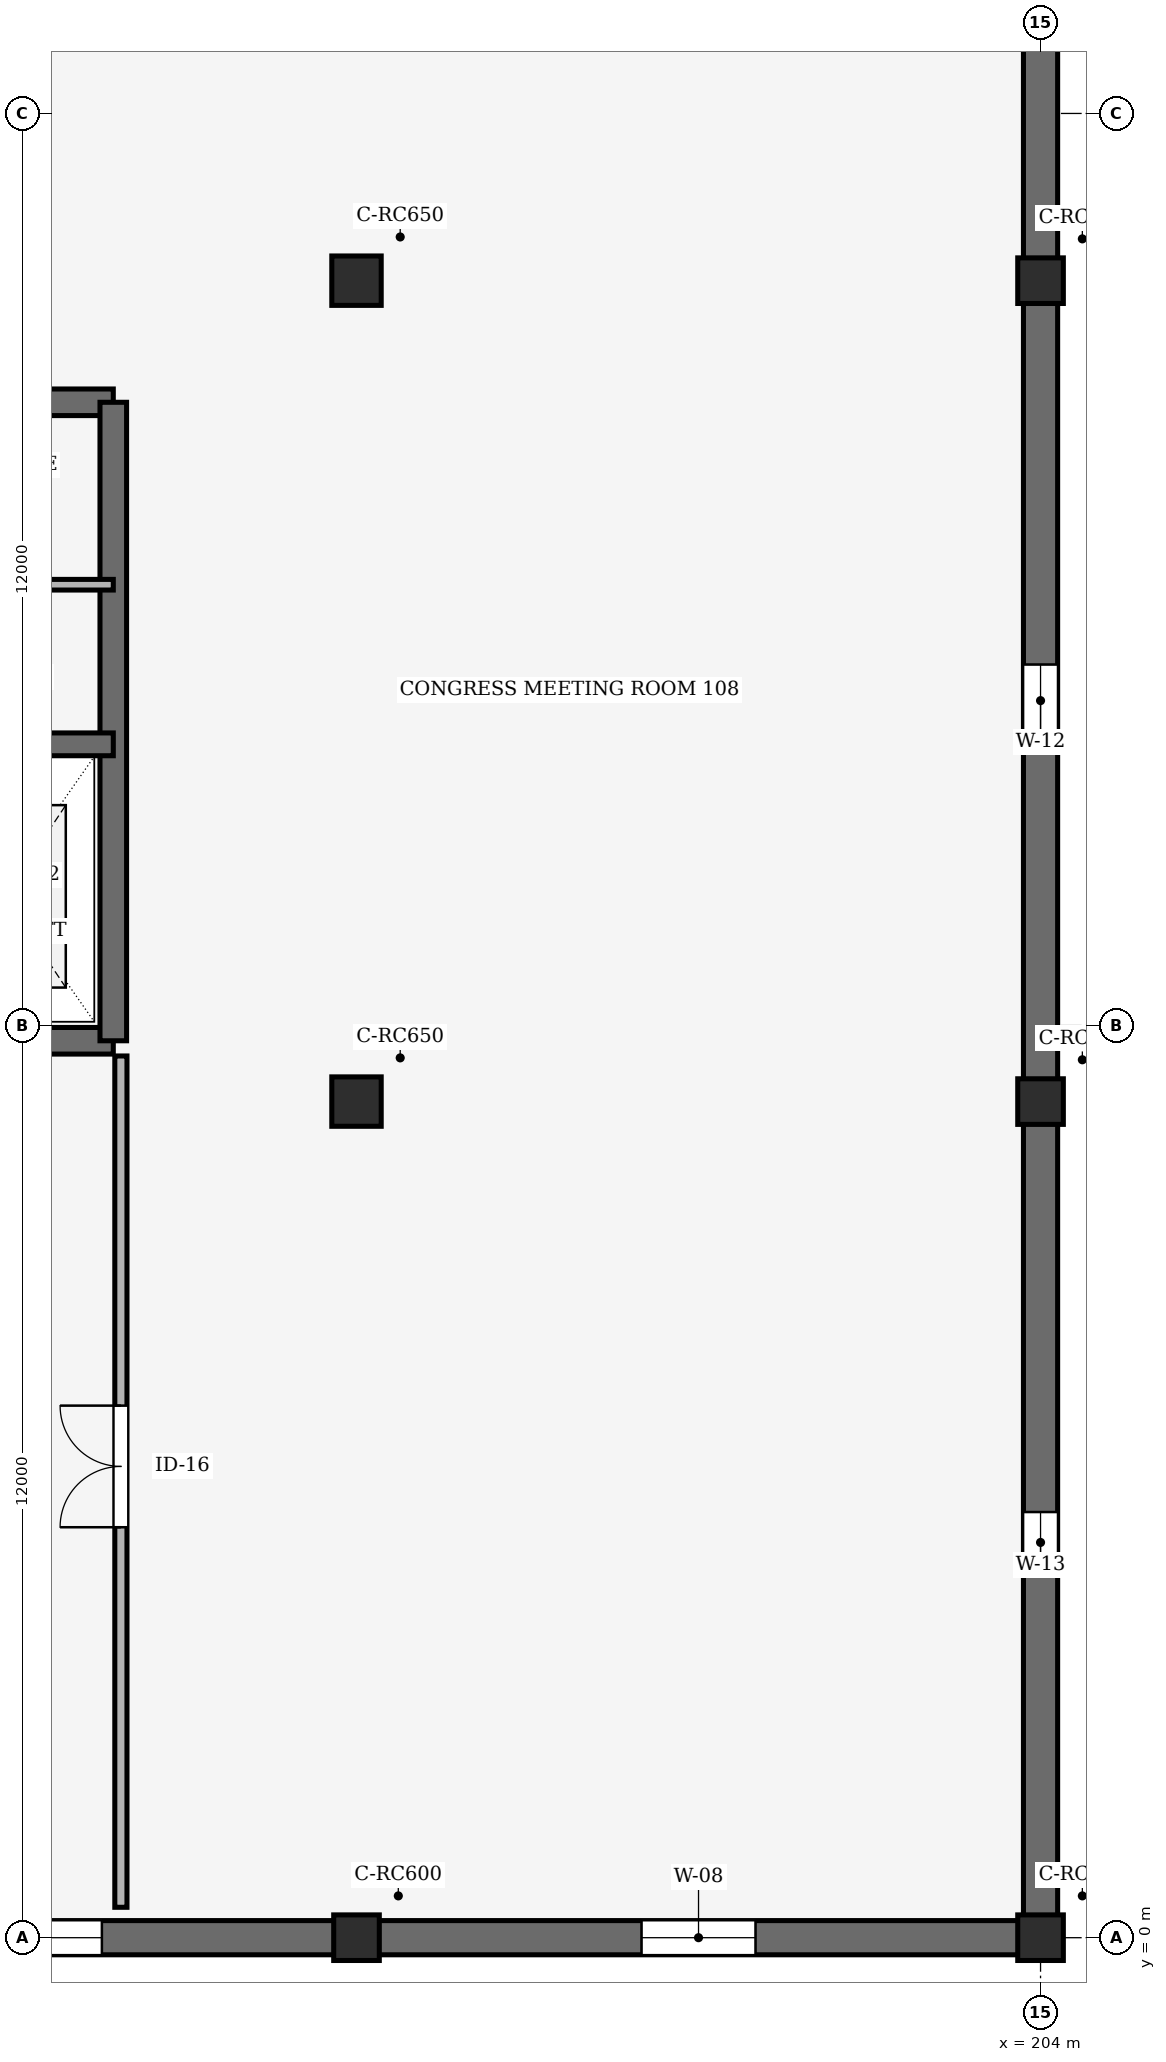
"""IFC4 building model, lengths in metres.
Left out: names, types, materials, properties, quantities, classifications, styles, units other than length and angle.
Written with IfcOpenShell. Run it as: python <this file> out.ifc"""

import sys

from ifc_helpers import new_model, si_unit, direction, frame, frame_2d, origin, origin_2d, place, context, subcontext, project, spatial, rectangle, extrude, element, fill, save


model = new_model("IFC4")
c1 = context("Model", 3, precision=1e-05, world=origin(), true_north=direction((0.0, 1.0)))
c2 = subcontext(c1, "Body", "Model", "MODEL_VIEW")
j1 = project(units=[si_unit("LENGTHUNIT", "METRE"), si_unit("PLANEANGLEUNIT", "RADIAN")], contexts=[c1])
p1 = place(None, origin())
s1 = spatial("IfcSite", under=j1, at=p1, CompositionType="ELEMENT")
p2 = place(p1, origin())
s2 = spatial("IfcBuilding", under=s1, at=p2, CompositionType="ELEMENT")
p3 = place(p2, frame((0.0, 0.0, 5.4)))
s3 = spatial("IfcBuildingStorey", under=s2, at=p3, CompositionType="ELEMENT", Elevation=5.4)
p4 = place(p3, frame((195.0, 0.0, 0.0), z_axis=(0.0, 0.0, 1.0), x_axis=(1.0, 0.0, 0.0)))
e1 = element("IfcColumn", 1, at=p4, inside=s3, PredefinedType="COLUMN", context=c2, shape_type="SweptSolid", body=[
    extrude(rectangle(XDim=0.6, YDim=0.6, at=origin_2d()), origin(), (0.0, 0.0, 1.0), 5.4),
])
for number, where, z_axis, x_axis in (
    (2, (195.0, 11.0, 0.0), (0.0, 0.0, 1.0), (1.0, 0.0, 0.0)),
    (3, (195.0, 21.8, 0.0), (0.0, 0.0, 1.0), (1.0, 0.0, 0.0)),
):
    element("IfcColumn", number, at=place(p3, frame(where, z_axis=z_axis, x_axis=x_axis)), inside=s3, PredefinedType="COLUMN", context=c2, shape_type="SweptSolid", body=[
        extrude(rectangle(XDim=0.65, YDim=0.65, at=origin_2d()), origin(), (0.0, 0.0, 1.0), 5.4),
    ])
for number, where, z_axis, x_axis in (
    (4, (204.0, 0.0, 0.0), (0.0, 0.0, 1.0), (1.0, 0.0, 0.0)),
    (5, (204.0, 11.0, 0.0), (0.0, 0.0, 1.0), (1.0, 0.0, 0.0)),
    (6, (204.0, 21.8, 0.0), (0.0, 0.0, 1.0), (1.0, 0.0, 0.0)),
):
    element("IfcColumn", number, at=place(p3, frame(where, z_axis=z_axis, x_axis=x_axis)), inside=s3, PredefinedType="COLUMN", context=c2, shape_type="SweptSolid", body=[
        extrude(rectangle(XDim=0.6, YDim=0.6, at=origin_2d()), origin(), (0.0, 0.0, 1.0), 5.4),
    ])
p5 = place(p3, frame((186.0, 0.0, 0.0), z_axis=(0.0, 0.0, 1.0), x_axis=(1.0, 0.0, 0.0)))
e7 = element("IfcWall", 7, at=p5, inside=s3, PredefinedType="SOLIDWALL", context=c2, shape_type="SweptSolid", body=[
    extrude(rectangle(XDim=9.0, YDim=0.45, at=frame_2d((4.5, 0.0))), origin(), (0.0, 0.0, 1.0), 4.3),
])
p6 = place(p5, frame((3.35, 0.0, 0.9)))
e8 = element("IfcOpeningElement", 8, at=p6, cuts=e7, PredefinedType="OPENING", context=c2, shape_type="SweptSolid", body=[
    extrude(rectangle(XDim=2.3, YDim=3.1, at=frame_2d((1.15, 1.55))), frame((0.0, 0.235, 0.0), z_axis=(0.0, -1.0, 0.0), x_axis=(1.0, 0.0, 0.0)), (0.0, 0.0, 1.0), 0.47),
])
p7 = place(p3, frame((195.0, 0.0, 0.0), z_axis=(0.0, 0.0, 1.0), x_axis=(1.0, 0.0, 0.0)))
e9 = element("IfcWall", 9, at=p7, inside=s3, PredefinedType="SOLIDWALL", context=c2, shape_type="SweptSolid", body=[
    extrude(rectangle(XDim=9.0, YDim=0.45, at=frame_2d((4.5, 0.0))), origin(), (0.0, 0.0, 1.0), 4.3),
])
p8 = place(p7, frame((3.75, 0.0, 0.9)))
e10 = element("IfcOpeningElement", 10, at=p8, cuts=e9, PredefinedType="OPENING", context=c2, shape_type="SweptSolid", body=[
    extrude(rectangle(XDim=1.5, YDim=2.15, at=frame_2d((0.75, 1.075))), frame((0.0, 0.235, 0.0), z_axis=(0.0, -1.0, 0.0), x_axis=(1.0, 0.0, 0.0)), (0.0, 0.0, 1.0), 0.47),
])
p9 = place(p3, frame((204.0, 0.0, 0.0), z_axis=(0.0, 0.0, 1.0), x_axis=(0.0, 1.0, 0.0)))
e11 = element("IfcWall", 11, at=p9, inside=s3, PredefinedType="SOLIDWALL", context=c2, shape_type="SweptSolid", body=[
    extrude(rectangle(XDim=11.0, YDim=0.45, at=frame_2d((5.5, 0.0))), origin(), (0.0, 0.0, 1.0), 4.3),
])
p10 = place(p9, frame((4.8, 0.0, 1.0)))
e12 = element("IfcOpeningElement", 12, at=p10, cuts=e11, PredefinedType="OPENING", context=c2, shape_type="SweptSolid", body=[
    extrude(rectangle(XDim=0.8, YDim=1.6, at=frame_2d((0.4, 0.8))), frame((0.0, 0.235, 0.0), z_axis=(0.0, -1.0, 0.0), x_axis=(1.0, 0.0, 0.0)), (0.0, 0.0, 1.0), 0.47),
])
p11 = place(p3, frame((204.0, 11.0, 0.0), z_axis=(0.0, 0.0, 1.0), x_axis=(0.0, 1.0, 0.0)))
e13 = element("IfcWall", 13, at=p11, inside=s3, PredefinedType="SOLIDWALL", context=c2, shape_type="SweptSolid", body=[
    extrude(rectangle(XDim=10.8, YDim=0.45, at=frame_2d((5.4, 0.0))), origin(), (0.0, 0.0, 1.0), 4.3),
])
p12 = place(p11, frame((4.8, 0.0, 1.0)))
e14 = element("IfcOpeningElement", 14, at=p12, cuts=e13, PredefinedType="OPENING", context=c2, shape_type="SweptSolid", body=[
    extrude(rectangle(XDim=0.95, YDim=2.1, at=frame_2d((0.475, 1.05))), frame((0.0, 0.235, 0.0), z_axis=(0.0, -1.0, 0.0), x_axis=(1.0, 0.0, 0.0)), (0.0, 0.0, 1.0), 0.47),
])
p13 = place(p3, frame((204.0, 21.8, 0.0), z_axis=(0.0, 0.0, 1.0), x_axis=(0.0, 1.0, 0.0)))
e15 = element("IfcWall", 15, at=p13, inside=s3, PredefinedType="SOLIDWALL", context=c2, shape_type="SweptSolid", body=[
    extrude(rectangle(XDim=11.0, YDim=0.45, at=frame_2d((5.5, 0.0))), origin(), (0.0, 0.0, 1.0), 4.3),
])
p14 = place(p13, frame((4.8, 0.0, 1.0)))
e16 = element("IfcOpeningElement", 16, at=p14, cuts=e15, PredefinedType="OPENING", context=c2, shape_type="SweptSolid", body=[
    extrude(rectangle(XDim=0.8, YDim=1.6, at=frame_2d((0.4, 0.8))), frame((0.0, 0.235, 0.0), z_axis=(0.0, -1.0, 0.0), x_axis=(1.0, 0.0, 0.0)), (0.0, 0.0, 1.0), 0.47),
])
for number, where, z_axis, x_axis in (
    (17, (181.6, 11.8, 0.0), (0.0, 0.0, 1.0), (1.0, 0.0, 0.0)),
    (18, (191.8, 20.2, 0.0), (0.0, 0.0, 1.0), (-1.0, 0.0, 0.0)),
):
    element("IfcWall", number, at=place(p3, frame(where, z_axis=z_axis, x_axis=x_axis)), inside=s3, PredefinedType="SHEAR", context=c2, shape_type="SweptSolid", body=[
        extrude(rectangle(XDim=10.2, YDim=0.35, at=frame_2d((5.1, 0.0))), origin(), (0.0, 0.0, 1.0), 5.4),
    ])
p15 = place(p3, frame((191.8, 11.8, 0.0), z_axis=(0.0, 0.0, 1.0), x_axis=(0.0, 1.0, 0.0)))
e19 = element("IfcWall", 19, at=p15, inside=s3, PredefinedType="SHEAR", context=c2, shape_type="SweptSolid", body=[
    extrude(rectangle(XDim=8.4, YDim=0.35, at=frame_2d((4.2, 0.0))), origin(), (0.0, 0.0, 1.0), 5.4),
])
p16 = place(p3, frame((181.6, 15.7, 0.0), z_axis=(0.0, 0.0, 1.0), x_axis=(1.0, 0.0, 0.0)))
e20 = element("IfcWall", 20, at=p16, inside=s3, PredefinedType="SHEAR", context=c2, shape_type="SweptSolid", body=[
    extrude(rectangle(XDim=10.2, YDim=0.3, at=frame_2d((5.1, 0.0))), origin(), (0.0, 0.0, 1.0), 5.4),
])
p17 = place(p16, frame((0.28, 0.0, 0.0)))
e21 = element("IfcOpeningElement", 21, at=p17, cuts=e20, PredefinedType="OPENING", context=c2, shape_type="SweptSolid", body=[
    extrude(rectangle(XDim=1.45, YDim=2.15, at=frame_2d((0.725, 1.075))), frame((0.0, 0.16, 0.0), z_axis=(0.0, -1.0, 0.0), x_axis=(1.0, 0.0, 0.0)), (0.0, 0.0, 1.0), 0.32),
])
p18 = place(p16, frame((8.225, 0.0, 0.0)))
e22 = element("IfcOpeningElement", 22, at=p18, cuts=e20, PredefinedType="OPENING", context=c2, shape_type="SweptSolid", body=[
    extrude(rectangle(XDim=1.1, YDim=2.15, at=frame_2d((0.55, 1.075))), frame((0.0, 0.16, 0.0), z_axis=(0.0, -1.0, 0.0), x_axis=(1.0, 0.0, 0.0)), (0.0, 0.0, 1.0), 0.32),
])
p19 = place(p3, frame((181.6, 17.8, 0.0), z_axis=(0.0, 0.0, 1.0), x_axis=(1.0, 0.0, 0.0)))
e23 = element("IfcWall", 23, at=p19, inside=s3, PredefinedType="PARTITIONING", context=c2, shape_type="SweptSolid", body=[
    extrude(rectangle(XDim=10.2, YDim=0.14, at=frame_2d((5.1, 0.0))), origin(), (0.0, 0.0, 1.0), 4.325),
])
p20 = place(p19, frame((0.9, 0.0, 0.0)))
e24 = element("IfcOpeningElement", 24, at=p20, cuts=e23, PredefinedType="OPENING", context=c2, shape_type="SweptSolid", body=[
    extrude(rectangle(XDim=0.9, YDim=2.1, at=frame_2d((0.45, 1.05))), frame((0.0, 0.08, 0.0), z_axis=(0.0, -1.0, 0.0), x_axis=(1.0, 0.0, 0.0)), (0.0, 0.0, 1.0), 0.16),
])
p21 = place(p19, frame((4.3, 0.0, 0.0)))
e25 = element("IfcOpeningElement", 25, at=p21, cuts=e23, PredefinedType="OPENING", context=c2, shape_type="SweptSolid", body=[
    extrude(rectangle(XDim=0.9, YDim=2.1, at=frame_2d((0.45, 1.05))), frame((0.0, 0.08, 0.0), z_axis=(0.0, -1.0, 0.0), x_axis=(1.0, 0.0, 0.0)), (0.0, 0.0, 1.0), 0.16),
])
p22 = place(p19, frame((7.7, 0.0, 0.0)))
e26 = element("IfcOpeningElement", 26, at=p22, cuts=e23, PredefinedType="OPENING", context=c2, shape_type="SweptSolid", body=[
    extrude(rectangle(XDim=0.95, YDim=2.1, at=frame_2d((0.475, 1.05))), frame((0.0, 0.08, 0.0), z_axis=(0.0, -1.0, 0.0), x_axis=(1.0, 0.0, 0.0)), (0.0, 0.0, 1.0), 0.16),
])
p23 = place(p3, frame((191.9, 0.4, 0.0), z_axis=(0.0, 0.0, 1.0), x_axis=(0.0, 1.0, 0.0)))
e27 = element("IfcWall", 27, at=p23, inside=s3, PredefinedType="PARTITIONING", context=c2, shape_type="SweptSolid", body=[
    extrude(rectangle(XDim=11.2, YDim=0.16, at=frame_2d((5.6, 0.0))), origin(), (0.0, 0.0, 1.0), 3.6),
])
p24 = place(p23, frame((5.0, 0.0, 0.0)))
e28 = element("IfcOpeningElement", 28, at=p24, cuts=e27, PredefinedType="OPENING", context=c2, shape_type="SweptSolid", body=[
    extrude(rectangle(XDim=1.6, YDim=2.2, at=frame_2d((0.8, 1.1))), frame((0.0, 0.09, 0.0), z_axis=(0.0, -1.0, 0.0), x_axis=(1.0, 0.0, 0.0)), (0.0, 0.0, 1.0), 0.18),
])
p25 = place(p6, origin())
e29 = element("IfcWindow", 29, at=p25, inside=s3, PartitioningType="DOUBLE_PANEL_VERTICAL", PredefinedType="WINDOW", context=c2, shape_type="SweptSolid", body=[
    extrude(rectangle(XDim=2.3, YDim=3.1, at=frame_2d((1.15, 1.55))), frame((0.0, 0.03, 0.0), z_axis=(0.0, -1.0, 0.0), x_axis=(1.0, 0.0, 0.0)), (0.0, 0.0, 1.0), 0.06),
])
fill(e8, e29)
p26 = place(p8, origin())
e30 = element("IfcWindow", 30, at=p26, inside=s3, PartitioningType="DOUBLE_PANEL_VERTICAL", PredefinedType="WINDOW", context=c2, shape_type="SweptSolid", body=[
    extrude(rectangle(XDim=1.5, YDim=2.15, at=frame_2d((0.75, 1.075))), frame((0.0, 0.03, 0.0), z_axis=(0.0, -1.0, 0.0), x_axis=(1.0, 0.0, 0.0)), (0.0, 0.0, 1.0), 0.06),
])
fill(e10, e30)
p27 = place(p10, origin())
e31 = element("IfcWindow", 31, at=p27, inside=s3, PartitioningType="SINGLE_PANEL", PredefinedType="WINDOW", context=c2, shape_type="SweptSolid", body=[
    extrude(rectangle(XDim=0.8, YDim=1.6, at=frame_2d((0.4, 0.8))), frame((0.0, 0.03, 0.0), z_axis=(0.0, -1.0, 0.0), x_axis=(1.0, 0.0, 0.0)), (0.0, 0.0, 1.0), 0.06),
])
fill(e12, e31)
p28 = place(p12, origin())
e32 = element("IfcWindow", 32, at=p28, inside=s3, PartitioningType="SINGLE_PANEL", PredefinedType="WINDOW", context=c2, shape_type="SweptSolid", body=[
    extrude(rectangle(XDim=0.95, YDim=2.1, at=frame_2d((0.475, 1.05))), frame((0.0, 0.03, 0.0), z_axis=(0.0, -1.0, 0.0), x_axis=(1.0, 0.0, 0.0)), (0.0, 0.0, 1.0), 0.06),
])
fill(e14, e32)
p29 = place(p24, origin())
e33 = element("IfcDoor", 33, at=p29, inside=s3, OperationType="DOUBLE_DOOR_SINGLE_SWING", PredefinedType="DOOR", context=c2, shape_type="SweptSolid", body=[
    extrude(rectangle(XDim=1.6, YDim=2.2, at=frame_2d((0.8, 1.1))), frame((0.0, 0.025, 0.0), z_axis=(0.0, -1.0, 0.0), x_axis=(1.0, 0.0, 0.0)), (0.0, 0.0, 1.0), 0.05),
])
fill(e28, e33)
save(model, sys.argv[1])
